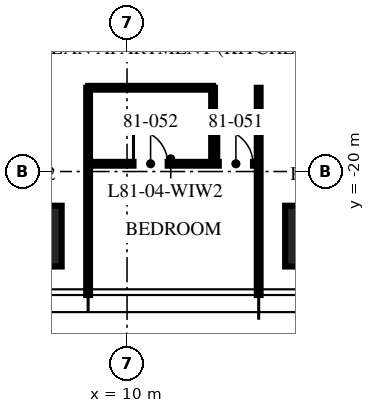
"""IFC4 building model, lengths in metres.
Left out: names, types, materials, properties, quantities, classifications, styles, units other than length and angle.
Written with IfcOpenShell. Run it as: python <this file> out.ifc"""

import sys

from ifc_helpers import new_model, si_unit, direction, frame, frame_2d, origin, origin_2d, place, context, subcontext, project, spatial, rectangle, extrude, element, fill, save


model = new_model("IFC4")
c1 = context("Model", 3, precision=1e-05, world=origin(), true_north=direction((0.0, 1.0)))
c2 = subcontext(c1, "Body", "Model", "MODEL_VIEW")
j1 = project(units=[si_unit("LENGTHUNIT", "METRE"), si_unit("PLANEANGLEUNIT", "RADIAN")], contexts=[c1])
p1 = place(None, origin())
s1 = spatial("IfcSite", under=j1, at=p1, CompositionType="ELEMENT")
p2 = place(p1, origin())
s2 = spatial("IfcBuilding", under=s1, at=p2, CompositionType="ELEMENT")
p3 = place(p2, frame((0.0, 0.0, 323.25)))
s3 = spatial("IfcBuildingStorey", under=s2, at=p3, CompositionType="ELEMENT", Elevation=323.25)
for number, where, z_axis, x_axis in (
    (1, (14.96, -21.7, 0.0), (0.0, 0.0, 1.0), (1.0, 0.0, 0.0)),
    (2, (7.48, -21.7, 0.0), (0.0, 0.0, 1.0), (1.0, 0.0, 0.0)),
):
    element("IfcColumn", number, at=place(p3, frame(where, z_axis=z_axis, x_axis=x_axis)), inside=s3, PredefinedType="COLUMN", context=c2, shape_type="SweptSolid", body=[
        extrude(rectangle(XDim=1.6, YDim=1.6, at=origin_2d()), origin(), (0.0, 0.0, 1.0), 3.75),
    ])
for number, where, z_axis, x_axis in (
    (3, (8.976, -17.796, 0.0), (0.0, 0.0, 1.0), (0.0, -1.0, 0.0)),
    (4, (13.464, -17.796, 0.0), (0.0, 0.0, 1.0), (0.0, -1.0, 0.0)),
):
    element("IfcWall", number, at=place(p3, frame(where, z_axis=z_axis, x_axis=x_axis)), inside=s3, PredefinedType="PARTITIONING", context=c2, shape_type="SweptSolid", body=[
        extrude(rectangle(XDim=5.454, YDim=0.1, at=frame_2d((2.727, 0.0))), origin(), (0.0, 0.0, 1.0), 3.01),
    ])
p4 = place(p3, frame((8.976, -19.796, 0.0), z_axis=(0.0, 0.0, 1.0), x_axis=(1.0, 0.0, 0.0)))
e5 = element("IfcWall", 5, at=p4, inside=s3, PredefinedType="PARTITIONING", context=c2, shape_type="SweptSolid", body=[
    extrude(rectangle(XDim=4.488, YDim=0.1, at=frame_2d((2.244, 0.0))), origin(), (0.0, 0.0, 1.0), 2.91),
])
p5 = place(p4, frame((3.438, 0.0, 0.0)))
e6 = element("IfcOpeningElement", 6, at=p5, cuts=e5, PredefinedType="OPENING", context=c2, shape_type="SweptSolid", body=[
    extrude(rectangle(XDim=0.9, YDim=2.1, at=frame_2d((0.45, 1.05))), frame((0.0, 0.06, 0.0), z_axis=(0.0, -1.0, 0.0), x_axis=(1.0, 0.0, 0.0)), (0.0, 0.0, 1.0), 0.12),
])
p6 = place(p4, frame((1.194, 0.0, 0.0)))
e7 = element("IfcOpeningElement", 7, at=p6, cuts=e5, PredefinedType="OPENING", context=c2, shape_type="SweptSolid", body=[
    extrude(rectangle(XDim=0.9, YDim=2.1, at=frame_2d((0.45, 1.05))), frame((0.0, 0.06, 0.0), z_axis=(0.0, -1.0, 0.0), x_axis=(1.0, 0.0, 0.0)), (0.0, 0.0, 1.0), 0.12),
])
p7 = place(p3, frame((12.264, -17.796, 0.0), z_axis=(0.0, 0.0, 1.0), x_axis=(0.0, -1.0, 0.0)))
e8 = element("IfcWall", 8, at=p7, inside=s3, PredefinedType="PARTITIONING", context=c2, shape_type="SweptSolid", body=[
    extrude(rectangle(XDim=2.0, YDim=0.1, at=frame_2d((1.0, 0.0))), origin(), (0.0, 0.0, 1.0), 3.5),
])
p8 = place(p3, frame((8.976, -17.796, 0.0), z_axis=(0.0, 0.0, 1.0), x_axis=(1.0, 0.0, 0.0)))
e9 = element("IfcWall", 9, at=p8, inside=s3, PredefinedType="PARTITIONING", context=c2, shape_type="SweptSolid", body=[
    extrude(rectangle(XDim=3.288, YDim=0.1, at=frame_2d((1.644, 0.0))), origin(), (0.0, 0.0, 1.0), 2.91),
])
p9 = place(p5, origin())
e10 = element("IfcDoor", 10, at=p9, inside=s3, OperationType="SINGLE_SWING_LEFT", PredefinedType="DOOR", context=c2, shape_type="SweptSolid", body=[
    extrude(rectangle(XDim=0.9, YDim=2.1, at=frame_2d((0.45, 1.05))), frame((0.0, 0.025, 0.0), z_axis=(0.0, -1.0, 0.0), x_axis=(1.0, 0.0, 0.0)), (0.0, 0.0, 1.0), 0.05),
])
fill(e6, e10)
p10 = place(p6, origin())
e11 = element("IfcDoor", 11, at=p10, inside=s3, OperationType="SINGLE_SWING_LEFT", PredefinedType="DOOR", context=c2, shape_type="SweptSolid", body=[
    extrude(rectangle(XDim=0.9, YDim=2.1, at=frame_2d((0.45, 1.05))), frame((0.0, 0.025, 0.0), z_axis=(0.0, -1.0, 0.0), x_axis=(1.0, 0.0, 0.0)), (0.0, 0.0, 1.0), 0.05),
])
fill(e7, e11)
save(model, sys.argv[1])
